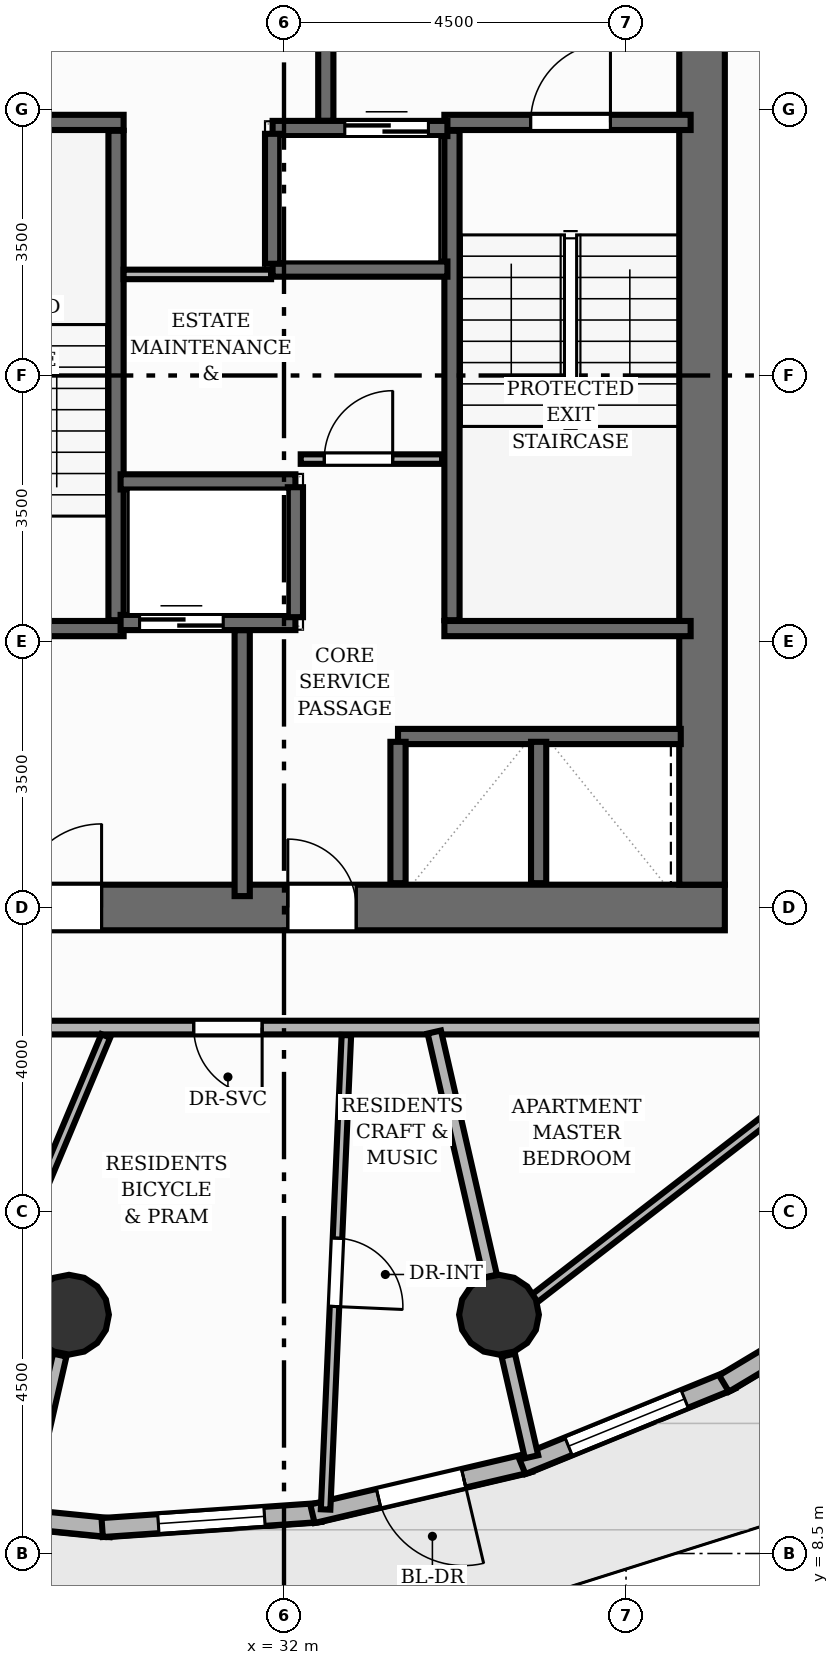
"""IFC4 building model, lengths in metres.
Left out: names, types, materials, properties, quantities, classifications, styles, units other than length and angle.
Written with IfcOpenShell. Run it as: python <this file> out.ifc"""

import sys

from ifc_helpers import new_model, si_unit, direction, frame, frame_2d, origin, origin_2d, place, context, subcontext, project, spatial, rectangle, circle, extrude, element, fill, save


model = new_model("IFC4")
c1 = context("Model", 3, precision=1e-05, world=origin(), true_north=direction((0.0, 1.0)))
c2 = subcontext(c1, "Body", "Model", "MODEL_VIEW")
j1 = project(units=[si_unit("LENGTHUNIT", "METRE"), si_unit("PLANEANGLEUNIT", "RADIAN")], contexts=[c1])
p1 = place(None, origin())
s1 = spatial("IfcSite", under=j1, at=p1, CompositionType="ELEMENT")
p2 = place(p1, origin())
s2 = spatial("IfcBuilding", under=s1, at=p2, CompositionType="ELEMENT")
p3 = place(p2, frame((0.0, 0.0, 148.96)))
s3 = spatial("IfcBuildingStorey", under=s2, at=p3, CompositionType="ELEMENT", Elevation=148.96)
p4 = place(p3, frame((22.7, 17.0, 0.0), z_axis=(0.0, 0.0, 1.0), x_axis=(1.0, 0.0, 0.0)))
e1 = element("IfcWall", 1, at=p4, inside=s3, PredefinedType="SHEAR", context=c2, shape_type="SweptSolid", body=[
    extrude(rectangle(XDim=15.1, YDim=0.6, at=frame_2d((7.55, 0.0))), origin(), (0.0, 0.0, 1.0), 3.2),
])
p5 = place(p4, frame((5.8, 0.0, 0.0)))
e2 = element("IfcOpeningElement", 2, at=p5, cuts=e1, PredefinedType="OPENING", context=c2, shape_type="SweptSolid", body=[
    extrude(rectangle(XDim=1.1, YDim=2.15, at=frame_2d((0.55, 1.075))), frame((0.0, 0.31, 0.0), z_axis=(0.0, -1.0, 0.0), x_axis=(1.0, 0.0, 0.0)), (0.0, 0.0, 1.0), 0.62),
])
p6 = place(p4, frame((9.35, 0.0, 0.0)))
e3 = element("IfcOpeningElement", 3, at=p6, cuts=e1, PredefinedType="OPENING", context=c2, shape_type="SweptSolid", body=[
    extrude(rectangle(XDim=0.9, YDim=2.1, at=frame_2d((0.45, 1.05))), frame((0.0, 0.31, 0.0), z_axis=(0.0, -1.0, 0.0), x_axis=(1.0, 0.0, 0.0)), (0.0, 0.0, 1.0), 0.62),
])
p7 = place(p3, frame((37.5, 17.3, 0.0), z_axis=(0.0, 0.0, 1.0), x_axis=(0.0, 1.0, 0.0)))
e4 = element("IfcWall", 4, at=p7, inside=s3, PredefinedType="SHEAR", context=c2, shape_type="SweptSolid", body=[
    extrude(rectangle(XDim=13.4, YDim=0.6, at=frame_2d((6.7, 0.0))), origin(), (0.0, 0.0, 1.0), 3.2),
])
for number, where, z_axis, x_axis in (
    (5, (29.171, 11.642, 0.0), (0.0, 0.0, 1.0), (1.0, 0.0, 0.0)),
    (6, (34.829, 11.642, 0.0), (0.0, 0.0, 1.0), (1.0, 0.0, 0.0)),
):
    element("IfcColumn", number, at=place(p3, frame(where, z_axis=z_axis, x_axis=x_axis)), inside=s3, PredefinedType="COLUMN", context=c2, shape_type="SweptSolid", body=[
        extrude(circle(Radius=0.525, at=origin_2d()), origin(), (0.0, 0.0, 1.0), 3.2),
    ])
p8 = place(p3, frame((29.719, 8.84, 0.0), z_axis=(0.0, 0.0, 1.0), x_axis=(-0.995013999105, 0.099735357744, 0.0)))
e7 = element("IfcWall", 7, at=p8, inside=s3, PredefinedType="SOLIDWALL", context=c2, shape_type="SweptSolid", body=[
    extrude(rectangle(XDim=2.818, YDim=0.25, at=frame_2d((1.409, 0.0))), origin(), (0.0, 0.0, 1.0), 2.96),
])
p9 = place(p8, frame((1.367, 0.0, 0.85)))
e8 = element("IfcOpeningElement", 8, at=p9, cuts=e7, PredefinedType="OPENING", context=c2, shape_type="SweptSolid", body=[
    extrude(rectangle(XDim=0.95, YDim=1.45, at=frame_2d((0.475, 0.725))), frame((0.0, 0.135, 0.0), z_axis=(0.0, -1.0, 0.0), x_axis=(1.0, 0.0, 0.0)), (0.0, 0.0, 1.0), 0.27),
])
p10 = place(p3, frame((32.483, 9.04, 0.0), z_axis=(0.0, 0.0, 1.0), x_axis=(-0.997630729469, -0.068796276206, 0.0)))
e9 = element("IfcWall", 9, at=p10, inside=s3, PredefinedType="SOLIDWALL", context=c2, shape_type="SweptSolid", body=[
    extrude(rectangle(XDim=2.882, YDim=0.25, at=frame_2d((1.441, 0.0))), origin(), (0.0, 0.0, 1.0), 2.96),
])
p11 = place(p10, frame((0.741, 0.0, 0.85)))
e10 = element("IfcOpeningElement", 10, at=p11, cuts=e9, PredefinedType="OPENING", context=c2, shape_type="SweptSolid", body=[
    extrude(rectangle(XDim=1.4, YDim=1.55, at=frame_2d((0.7, 0.775))), frame((0.0, 0.135, 0.0), z_axis=(0.0, -1.0, 0.0), x_axis=(1.0, 0.0, 0.0)), (0.0, 0.0, 1.0), 0.27),
])
p12 = place(p3, frame((35.233, 9.695, 0.0), z_axis=(0.0, 0.0, 1.0), x_axis=(-0.973538048261, -0.228524984602, 0.0)))
e11 = element("IfcWall", 11, at=p12, inside=s3, PredefinedType="SOLIDWALL", context=c2, shape_type="SweptSolid", body=[
    extrude(rectangle(XDim=2.937, YDim=0.25, at=frame_2d((1.468, 0.0))), origin(), (0.0, 0.0, 1.0), 2.96),
])
p13 = place(p12, frame((0.893, 0.0, 0.0)))
e12 = element("IfcOpeningElement", 12, at=p13, cuts=e11, PredefinedType="OPENING", context=c2, shape_type="SweptSolid", body=[
    extrude(rectangle(XDim=1.15, YDim=2.2, at=frame_2d((0.575, 1.1))), frame((0.0, 0.135, 0.0), z_axis=(0.0, -1.0, 0.0), x_axis=(1.0, 0.0, 0.0)), (0.0, 0.0, 1.0), 0.27),
])
p14 = place(p3, frame((37.886, 10.785, 0.0), z_axis=(0.0, 0.0, 1.0), x_axis=(-0.926076439021, -0.377335963154, 0.0)))
e13 = element("IfcWall", 13, at=p14, inside=s3, PredefinedType="SOLIDWALL", context=c2, shape_type="SweptSolid", body=[
    extrude(rectangle(XDim=2.977, YDim=0.25, at=frame_2d((1.488, 0.0))), origin(), (0.0, 0.0, 1.0), 2.96),
])
p15 = place(p14, frame((0.664, 0.0, 0.85)))
e14 = element("IfcOpeningElement", 14, at=p15, cuts=e13, PredefinedType="OPENING", context=c2, shape_type="SweptSolid", body=[
    extrude(rectangle(XDim=1.65, YDim=1.55, at=frame_2d((0.825, 0.775))), frame((0.0, 0.135, 0.0), z_axis=(0.0, -1.0, 0.0), x_axis=(1.0, 0.0, 0.0)), (0.0, 0.0, 1.0), 0.27),
])
p16 = place(p3, frame((40.361, 12.277, 0.0), z_axis=(0.0, 0.0, 1.0), x_axis=(-0.857816062946, -0.513956809617, 0.0)))
e15 = element("IfcWall", 15, at=p16, inside=s3, PredefinedType="SOLIDWALL", context=c2, shape_type="SweptSolid", body=[
    extrude(rectangle(XDim=2.998, YDim=0.25, at=frame_2d((1.499, 0.0))), origin(), (0.0, 0.0, 1.0), 2.96),
])
p17 = place(p3, frame((29.79, 20.78, 0.0), z_axis=(0.0, 0.0, 1.0), x_axis=(0.0, 1.0, 0.0)))
e16 = element("IfcWall", 16, at=p17, inside=s3, PredefinedType="SHEAR", context=c2, shape_type="SweptSolid", body=[
    extrude(rectangle(XDim=6.44, YDim=0.2, at=frame_2d((3.22, 0.0))), origin(), (0.0, 0.0, 1.0), 3.2),
])
p18 = place(p3, frame((26.65, 27.33, 0.0), z_axis=(0.0, 0.0, 1.0), x_axis=(1.0, 0.0, 0.0)))
e17 = element("IfcWall", 17, at=p18, inside=s3, PredefinedType="SHEAR", context=c2, shape_type="SweptSolid", body=[
    extrude(rectangle(XDim=3.24, YDim=0.2, at=frame_2d((1.62, 0.0))), origin(), (0.0, 0.0, 1.0), 3.2),
])
p19 = place(p3, frame((26.65, 20.67, 0.0), z_axis=(0.0, 0.0, 1.0), x_axis=(1.0, 0.0, 0.0)))
e18 = element("IfcWall", 18, at=p19, inside=s3, PredefinedType="SHEAR", context=c2, shape_type="SweptSolid", body=[
    extrude(rectangle(XDim=3.24, YDim=0.2, at=frame_2d((1.62, 0.0))), origin(), (0.0, 0.0, 1.0), 3.2),
])
p20 = place(p19, frame((1.055, 0.0, 0.0)))
e19 = element("IfcOpeningElement", 19, at=p20, cuts=e18, PredefinedType="OPENING", context=c2, shape_type="SweptSolid", body=[
    extrude(rectangle(XDim=1.05, YDim=2.15, at=frame_2d((0.525, 1.075))), frame((0.0, 0.11, 0.0), z_axis=(0.0, -1.0, 0.0), x_axis=(1.0, 0.0, 0.0)), (0.0, 0.0, 1.0), 0.22),
])
p21 = place(p3, frame((34.21, 20.78, 0.0), z_axis=(0.0, 0.0, 1.0), x_axis=(0.0, 1.0, 0.0)))
e20 = element("IfcWall", 20, at=p21, inside=s3, PredefinedType="SHEAR", context=c2, shape_type="SweptSolid", body=[
    extrude(rectangle(XDim=6.44, YDim=0.2, at=frame_2d((3.22, 0.0))), origin(), (0.0, 0.0, 1.0), 3.2),
])
p22 = place(p3, frame((34.11, 20.67, 0.0), z_axis=(0.0, 0.0, 1.0), x_axis=(1.0, 0.0, 0.0)))
e21 = element("IfcWall", 21, at=p22, inside=s3, PredefinedType="SHEAR", context=c2, shape_type="SweptSolid", body=[
    extrude(rectangle(XDim=3.24, YDim=0.2, at=frame_2d((1.62, 0.0))), origin(), (0.0, 0.0, 1.0), 3.2),
])
p23 = place(p3, frame((34.11, 27.33, 0.0), z_axis=(0.0, 0.0, 1.0), x_axis=(1.0, 0.0, 0.0)))
e22 = element("IfcWall", 22, at=p23, inside=s3, PredefinedType="SHEAR", context=c2, shape_type="SweptSolid", body=[
    extrude(rectangle(XDim=3.24, YDim=0.2, at=frame_2d((1.62, 0.0))), origin(), (0.0, 0.0, 1.0), 3.2),
])
p24 = place(p23, frame((1.135, 0.0, 0.0)))
e23 = element("IfcOpeningElement", 23, at=p24, cuts=e22, PredefinedType="OPENING", context=c2, shape_type="SweptSolid", body=[
    extrude(rectangle(XDim=1.05, YDim=2.15, at=frame_2d((0.525, 1.075))), frame((0.0, 0.11, 0.0), z_axis=(0.0, -1.0, 0.0), x_axis=(1.0, 0.0, 0.0)), (0.0, 0.0, 1.0), 0.22),
])
for number, where, z_axis, x_axis in (
    (24, (31.45, 17.15, 0.0), (0.0, 0.0, 1.0), (0.0, 1.0, 0.0)),
    (25, (32.55, 27.35, 0.0), (0.0, 0.0, 1.0), (0.0, 1.0, 0.0)),
):
    element("IfcWall", number, at=place(p3, frame(where, z_axis=z_axis, x_axis=x_axis)), inside=s3, PredefinedType="SHEAR", context=c2, shape_type="SweptSolid", body=[
        extrude(rectangle(XDim=3.5, YDim=0.2, at=frame_2d((1.75, 0.0))), origin(), (0.0, 0.0, 1.0), 3.2),
    ])
p25 = place(p3, frame((29.85, 20.75, 0.0), z_axis=(0.0, 0.0, 1.0), x_axis=(1.0, 0.0, 0.0)))
e26 = element("IfcWall", 26, at=p25, inside=s3, PredefinedType="SHEAR", context=c2, shape_type="SweptSolid", body=[
    extrude(rectangle(XDim=2.3, YDim=0.2, at=frame_2d((1.15, 0.0))), origin(), (0.0, 0.0, 1.0), 3.2),
])
p26 = place(p25, frame((0.25, 0.0, 0.0)))
e27 = element("IfcOpeningElement", 27, at=p26, cuts=e26, PredefinedType="OPENING", context=c2, shape_type="SweptSolid", body=[
    extrude(rectangle(XDim=1.1, YDim=2.15, at=frame_2d((0.55, 1.075))), frame((0.0, 0.11, 0.0), z_axis=(0.0, -1.0, 0.0), x_axis=(1.0, 0.0, 0.0)), (0.0, 0.0, 1.0), 0.22),
])
p27 = place(p3, frame((29.85, 22.6, 0.0), z_axis=(0.0, 0.0, 1.0), x_axis=(1.0, 0.0, 0.0)))
e28 = element("IfcWall", 28, at=p27, inside=s3, PredefinedType="SHEAR", context=c2, shape_type="SweptSolid", body=[
    extrude(rectangle(XDim=2.3, YDim=0.2, at=frame_2d((1.15, 0.0))), origin(), (0.0, 0.0, 1.0), 3.2),
])
p28 = place(p3, frame((32.15, 20.82, 0.0), z_axis=(0.0, 0.0, 1.0), x_axis=(0.0, 1.0, 0.0)))
e29 = element("IfcWall", 29, at=p28, inside=s3, PredefinedType="SHEAR", context=c2, shape_type="SweptSolid", body=[
    extrude(rectangle(XDim=1.71, YDim=0.2, at=frame_2d((0.855, 0.0))), origin(), (0.0, 0.0, 1.0), 3.2),
])
p29 = place(p3, frame((31.85, 27.25, 0.0), z_axis=(0.0, 0.0, 1.0), x_axis=(1.0, 0.0, 0.0)))
e30 = element("IfcWall", 30, at=p29, inside=s3, PredefinedType="SHEAR", context=c2, shape_type="SweptSolid", body=[
    extrude(rectangle(XDim=2.3, YDim=0.2, at=frame_2d((1.15, 0.0))), origin(), (0.0, 0.0, 1.0), 3.2),
])
p30 = place(p29, frame((0.95, 0.0, 0.0)))
e31 = element("IfcOpeningElement", 31, at=p30, cuts=e30, PredefinedType="OPENING", context=c2, shape_type="SweptSolid", body=[
    extrude(rectangle(XDim=1.1, YDim=2.15, at=frame_2d((0.55, 1.075))), frame((0.0, 0.11, 0.0), z_axis=(0.0, -1.0, 0.0), x_axis=(1.0, 0.0, 0.0)), (0.0, 0.0, 1.0), 0.22),
])
p31 = place(p3, frame((31.85, 25.4, 0.0), z_axis=(0.0, 0.0, 1.0), x_axis=(1.0, 0.0, 0.0)))
e32 = element("IfcWall", 32, at=p31, inside=s3, PredefinedType="SHEAR", context=c2, shape_type="SweptSolid", body=[
    extrude(rectangle(XDim=2.3, YDim=0.2, at=frame_2d((1.15, 0.0))), origin(), (0.0, 0.0, 1.0), 3.2),
])
p32 = place(p3, frame((31.85, 25.47, 0.0), z_axis=(0.0, 0.0, 1.0), x_axis=(0.0, 1.0, 0.0)))
e33 = element("IfcWall", 33, at=p32, inside=s3, PredefinedType="SHEAR", context=c2, shape_type="SweptSolid", body=[
    extrude(rectangle(XDim=1.71, YDim=0.2, at=frame_2d((0.855, 0.0))), origin(), (0.0, 0.0, 1.0), 3.2),
])
p33 = place(p3, frame((33.5, 19.25, 0.0), z_axis=(0.0, 0.0, 1.0), x_axis=(1.0, 0.0, 0.0)))
e34 = element("IfcWall", 34, at=p33, inside=s3, PredefinedType="SHEAR", context=c2, shape_type="SweptSolid", body=[
    extrude(rectangle(XDim=3.72, YDim=0.2, at=frame_2d((1.86, 0.0))), origin(), (0.0, 0.0, 1.0), 3.2),
])
for number, where, z_axis, x_axis in (
    (35, (33.5, 17.32, 0.0), (0.0, 0.0, 1.0), (0.0, 1.0, 0.0)),
    (36, (35.35, 17.32, 0.0), (0.0, 0.0, 1.0), (0.0, 1.0, 0.0)),
):
    element("IfcWall", number, at=place(p3, frame(where, z_axis=z_axis, x_axis=x_axis)), inside=s3, PredefinedType="SHEAR", context=c2, shape_type="SweptSolid", body=[
        extrude(rectangle(XDim=1.86, YDim=0.2, at=frame_2d((0.93, 0.0))), origin(), (0.0, 0.0, 1.0), 3.2),
    ])
p34 = place(p3, frame((32.22, 22.9, 0.0), z_axis=(0.0, 0.0, 1.0), x_axis=(1.0, 0.0, 0.0)))
e37 = element("IfcWall", 37, at=p34, inside=s3, PredefinedType="PARTITIONING", context=c2, shape_type="SweptSolid", body=[
    extrude(rectangle(XDim=1.86, YDim=0.125, at=frame_2d((0.93, 0.0))), origin(), (0.0, 0.0, 1.0), 2.955),
])
p35 = place(p34, frame((0.31, 0.0, 0.0)))
e38 = element("IfcOpeningElement", 38, at=p35, cuts=e37, PredefinedType="OPENING", context=c2, shape_type="SweptSolid", body=[
    extrude(rectangle(XDim=0.9, YDim=2.1, at=frame_2d((0.45, 1.05))), frame((0.0, 0.073, 0.0), z_axis=(0.0, -1.0, 0.0), x_axis=(1.0, 0.0, 0.0)), (0.0, 0.0, 1.0), 0.145),
])
p36 = place(p3, frame((29.89, 25.33, 0.0), z_axis=(0.0, 0.0, 1.0), x_axis=(1.0, 0.0, 0.0)))
e39 = element("IfcWall", 39, at=p36, inside=s3, PredefinedType="PARTITIONING", context=c2, shape_type="SweptSolid", body=[
    extrude(rectangle(XDim=1.94, YDim=0.125, at=frame_2d((0.97, 0.0))), origin(), (0.0, 0.0, 1.0), 2.955),
])
p37 = place(p3, frame((29.05, 11.111, 0.0), z_axis=(0.0, 0.0, 1.0), x_axis=(-0.223080127706, -0.974800111111, 0.0)))
e40 = element("IfcWall", 40, at=p37, inside=s3, PredefinedType="PARTITIONING", context=c2, shape_type="SweptSolid", body=[
    extrude(rectangle(XDim=2.155, YDim=0.18, at=frame_2d((1.077, 0.0))), origin(), (0.0, 0.0, 1.0), 2.336),
])
p38 = place(p3, frame((34.95, 11.111, 0.0), z_axis=(0.0, 0.0, 1.0), x_axis=(0.223027623572, -0.974812125039, 0.0)))
e41 = element("IfcWall", 41, at=p38, inside=s3, PredefinedType="PARTITIONING", context=c2, shape_type="SweptSolid", body=[
    extrude(rectangle(XDim=1.373, YDim=0.18, at=frame_2d((0.687, 0.0))), origin(), (0.0, 0.0, 1.0), 2.336),
])
p39 = place(p3, frame((39.08, 15.42, 0.0), z_axis=(0.0, 0.0, 1.0), x_axis=(-1.0, 0.0, 0.0)))
e42 = element("IfcWall", 42, at=p39, inside=s3, PredefinedType="PARTITIONING", context=c2, shape_type="SweptSolid", body=[
    extrude(rectangle(XDim=17.66, YDim=0.18, at=frame_2d((8.83, 0.0))), origin(), (0.0, 0.0, 1.0), 2.955),
])
p40 = place(p39, frame((7.368, 0.0, 0.0)))
e43 = element("IfcOpeningElement", 43, at=p40, cuts=e42, PredefinedType="OPENING", context=c2, shape_type="SweptSolid", body=[
    extrude(rectangle(XDim=0.9, YDim=2.1, at=frame_2d((0.45, 1.05))), frame((0.0, 0.1, 0.0), z_axis=(0.0, -1.0, 0.0), x_axis=(1.0, 0.0, 0.0)), (0.0, 0.0, 1.0), 0.2),
])
p41 = place(p39, frame((10.224, 0.0, 0.0)))
e44 = element("IfcOpeningElement", 44, at=p41, cuts=e42, PredefinedType="OPENING", context=c2, shape_type="SweptSolid", body=[
    extrude(rectangle(XDim=0.9, YDim=2.1, at=frame_2d((0.45, 1.05))), frame((0.0, 0.1, 0.0), z_axis=(0.0, -1.0, 0.0), x_axis=(1.0, 0.0, 0.0)), (0.0, 0.0, 1.0), 0.2),
])
p42 = place(p39, frame((14.353, 0.0, 0.0)))
e45 = element("IfcOpeningElement", 45, at=p42, cuts=e42, PredefinedType="OPENING", context=c2, shape_type="SweptSolid", body=[
    extrude(rectangle(XDim=0.9, YDim=2.1, at=frame_2d((0.45, 1.05))), frame((0.0, 0.1, 0.0), z_axis=(0.0, -1.0, 0.0), x_axis=(1.0, 0.0, 0.0)), (0.0, 0.0, 1.0), 0.2),
])
p43 = place(p3, frame((27.059, 9.122, 0.0), z_axis=(0.0, 0.0, 1.0), x_axis=(0.386926287161, 0.922110648623, 0.0)))
e46 = element("IfcWall", 46, at=p43, inside=s3, PredefinedType="PARTITIONING", context=c2, shape_type="SweptSolid", body=[
    extrude(rectangle(XDim=6.71, YDim=0.125, at=frame_2d((3.355, 0.0))), origin(), (0.0, 0.0, 1.0), 2.955),
])
p44 = place(p3, frame((32.821, 15.32, 0.0), z_axis=(0.0, 0.0, 1.0), x_axis=(-0.043813760095, -0.999039716141, 0.0)))
e47 = element("IfcWall", 47, at=p44, inside=s3, PredefinedType="PARTITIONING", context=c2, shape_type="SweptSolid", body=[
    extrude(rectangle(XDim=6.247, YDim=0.125, at=frame_2d((3.123, 0.0))), origin(), (0.0, 0.0, 1.0), 2.692),
])
p45 = place(p44, frame((2.673, 0.0, 0.0)))
e48 = element("IfcOpeningElement", 48, at=p45, cuts=e47, PredefinedType="OPENING", context=c2, shape_type="SweptSolid", body=[
    extrude(rectangle(XDim=0.9, YDim=2.1, at=frame_2d((0.45, 1.05))), frame((0.0, 0.073, 0.0), z_axis=(0.0, -1.0, 0.0), x_axis=(1.0, 0.0, 0.0)), (0.0, 0.0, 1.0), 0.145),
])
p46 = place(p3, frame((33.977, 15.362, 0.0), z_axis=(0.0, 0.0, 1.0), x_axis=(0.22319287001, -0.974774303506, 0.0)))
e49 = element("IfcWall", 49, at=p46, inside=s3, PredefinedType="PARTITIONING", context=c2, shape_type="SweptSolid", body=[
    extrude(rectangle(XDim=3.296, YDim=0.18, at=frame_2d((1.648, 0.0))), origin(), (0.0, 0.0, 1.0), 2.336),
])
p47 = place(p3, frame((43.184, 17.96, 0.0), z_axis=(0.0, 0.0, 1.0), x_axis=(-0.790862802872, -0.611993486104, 0.0)))
e50 = element("IfcWall", 50, at=p47, inside=s3, PredefinedType="PARTITIONING", context=c2, shape_type="SweptSolid", body=[
    extrude(rectangle(XDim=9.975, YDim=0.125, at=frame_2d((4.987, 0.0))), origin(), (0.0, 0.0, 1.0), 2.411),
])
p48 = place(p47, frame((3.417, 0.0, 0.0)))
e51 = element("IfcOpeningElement", 51, at=p48, cuts=e50, PredefinedType="OPENING", context=c2, shape_type="SweptSolid", body=[
    extrude(rectangle(XDim=0.9, YDim=2.1, at=frame_2d((0.45, 1.05))), frame((0.0, 0.073, 0.0), z_axis=(0.0, -1.0, 0.0), x_axis=(1.0, 0.0, 0.0)), (0.0, 0.0, 1.0), 0.145),
])
p49 = place(p13, origin())
e52 = element("IfcDoor", 52, at=p49, inside=s3, OperationType="SINGLE_SWING_LEFT", PredefinedType="DOOR", context=c2, shape_type="SweptSolid", body=[
    extrude(rectangle(XDim=1.15, YDim=2.2, at=frame_2d((0.575, 1.1))), frame((0.0, 0.025, 0.0), z_axis=(0.0, -1.0, 0.0), x_axis=(1.0, 0.0, 0.0)), (0.0, 0.0, 1.0), 0.05),
])
fill(e12, e52)
p50 = place(p11, origin())
e53 = element("IfcWindow", 53, at=p50, inside=s3, PartitioningType="SINGLE_PANEL", PredefinedType="WINDOW", context=c2, shape_type="SweptSolid", body=[
    extrude(rectangle(XDim=1.4, YDim=1.55, at=frame_2d((0.7, 0.775))), frame((0.0, 0.03, 0.0), z_axis=(0.0, -1.0, 0.0), x_axis=(1.0, 0.0, 0.0)), (0.0, 0.0, 1.0), 0.06),
])
fill(e10, e53)
p51 = place(p15, origin())
e54 = element("IfcWindow", 54, at=p51, inside=s3, PartitioningType="SINGLE_PANEL", PredefinedType="WINDOW", context=c2, shape_type="SweptSolid", body=[
    extrude(rectangle(XDim=1.65, YDim=1.55, at=frame_2d((0.825, 0.775))), frame((0.0, 0.03, 0.0), z_axis=(0.0, -1.0, 0.0), x_axis=(1.0, 0.0, 0.0)), (0.0, 0.0, 1.0), 0.06),
])
fill(e14, e54)
p52 = place(p24, origin())
e55 = element("IfcDoor", 55, at=p52, inside=s3, OperationType="SINGLE_SWING_RIGHT", PredefinedType="DOOR", context=c2, shape_type="SweptSolid", body=[
    extrude(rectangle(XDim=1.05, YDim=2.15, at=frame_2d((0.525, 1.075))), frame((0.0, 0.025, 0.0), z_axis=(0.0, -1.0, 0.0), x_axis=(1.0, 0.0, 0.0)), (0.0, 0.0, 1.0), 0.05),
])
fill(e23, e55)
p53 = place(p5, origin())
e56 = element("IfcDoor", 56, at=p53, inside=s3, OperationType="SINGLE_SWING_RIGHT", PredefinedType="DOOR", context=c2, shape_type="SweptSolid", body=[
    extrude(rectangle(XDim=1.1, YDim=2.15, at=frame_2d((0.55, 1.075))), frame((0.0, 0.025, 0.0), z_axis=(0.0, -1.0, 0.0), x_axis=(1.0, 0.0, 0.0)), (0.0, 0.0, 1.0), 0.05),
])
fill(e2, e56)
p54 = place(p26, origin())
e57 = element("IfcDoor", 57, at=p54, inside=s3, OperationType="DOUBLE_DOOR_SLIDING", PredefinedType="DOOR", context=c2, shape_type="SweptSolid", body=[
    extrude(rectangle(XDim=1.1, YDim=2.15, at=frame_2d((0.55, 1.075))), frame((0.0, 0.025, 0.0), z_axis=(0.0, -1.0, 0.0), x_axis=(1.0, 0.0, 0.0)), (0.0, 0.0, 1.0), 0.05),
])
fill(e27, e57)
p55 = place(p30, origin())
e58 = element("IfcDoor", 58, at=p55, inside=s3, OperationType="DOUBLE_DOOR_SLIDING", PredefinedType="DOOR", context=c2, shape_type="SweptSolid", body=[
    extrude(rectangle(XDim=1.1, YDim=2.15, at=frame_2d((0.55, 1.075))), frame((0.0, 0.025, 0.0), z_axis=(0.0, -1.0, 0.0), x_axis=(1.0, 0.0, 0.0)), (0.0, 0.0, 1.0), 0.05),
])
fill(e31, e58)
p56 = place(p6, origin())
e59 = element("IfcDoor", 59, at=p56, inside=s3, OperationType="SINGLE_SWING_LEFT", PredefinedType="DOOR", context=c2, shape_type="SweptSolid", body=[
    extrude(rectangle(XDim=0.9, YDim=2.1, at=frame_2d((0.45, 1.05))), frame((0.0, 0.025, 0.0), z_axis=(0.0, -1.0, 0.0), x_axis=(1.0, 0.0, 0.0)), (0.0, 0.0, 1.0), 0.05),
])
fill(e3, e59)
p57 = place(p35, origin())
e60 = element("IfcDoor", 60, at=p57, inside=s3, OperationType="SINGLE_SWING_RIGHT", PredefinedType="DOOR", context=c2, shape_type="SweptSolid", body=[
    extrude(rectangle(XDim=0.9, YDim=2.1, at=frame_2d((0.45, 1.05))), frame((0.0, 0.025, 0.0), z_axis=(0.0, -1.0, 0.0), x_axis=(1.0, 0.0, 0.0)), (0.0, 0.0, 1.0), 0.05),
])
fill(e38, e60)
p58 = place(p40, origin())
e61 = element("IfcDoor", 61, at=p58, inside=s3, OperationType="SINGLE_SWING_LEFT", PredefinedType="DOOR", context=c2, shape_type="SweptSolid", body=[
    extrude(rectangle(XDim=0.9, YDim=2.1, at=frame_2d((0.45, 1.05))), frame((0.0, 0.025, 0.0), z_axis=(0.0, -1.0, 0.0), x_axis=(1.0, 0.0, 0.0)), (0.0, 0.0, 1.0), 0.05),
])
fill(e43, e61)
p59 = place(p45, origin())
e62 = element("IfcDoor", 62, at=p59, inside=s3, OperationType="SINGLE_SWING_RIGHT", PredefinedType="DOOR", context=c2, shape_type="SweptSolid", body=[
    extrude(rectangle(XDim=0.9, YDim=2.1, at=frame_2d((0.45, 1.05))), frame((0.0, 0.025, 0.0), z_axis=(0.0, -1.0, 0.0), x_axis=(1.0, 0.0, 0.0)), (0.0, 0.0, 1.0), 0.05),
])
fill(e48, e62)
save(model, sys.argv[1])
